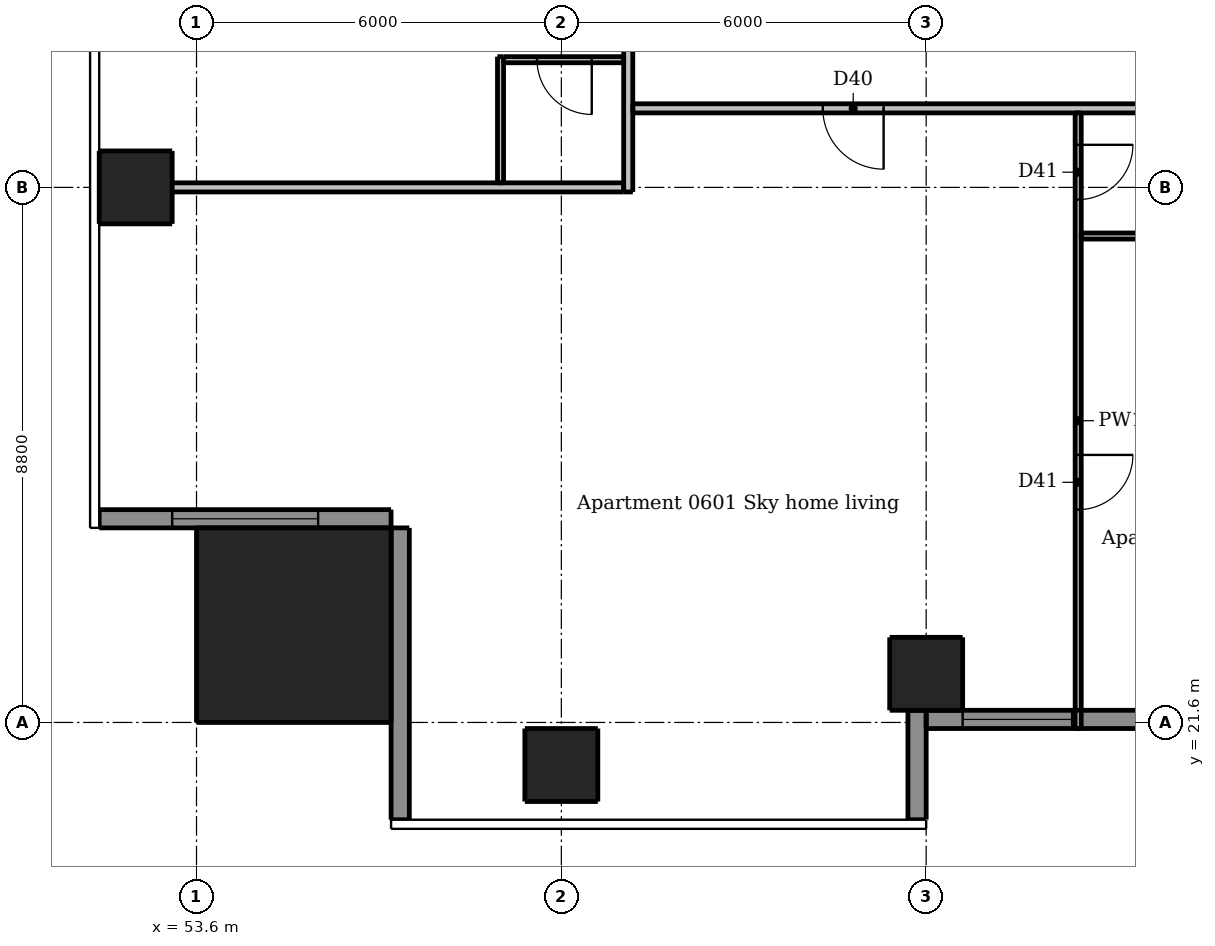
"""IFC4 building model, lengths in metres.
Left out: names, types, materials, properties, quantities, classifications, styles, units other than length and angle.
Written with IfcOpenShell. Run it as: python <this file> out.ifc"""

import sys

from ifc_helpers import new_model, si_unit, direction, frame, frame_2d, origin, origin_2d, place, context, subcontext, project, spatial, rectangle, extrude, element, fill, save


model = new_model("IFC4")
c1 = context("Model", 3, precision=1e-05, world=origin(), true_north=direction((0.0, 1.0)))
c2 = subcontext(c1, "Body", "Model", "MODEL_VIEW")
j1 = project(units=[si_unit("LENGTHUNIT", "METRE"), si_unit("PLANEANGLEUNIT", "RADIAN")], contexts=[c1])
p1 = place(None, origin())
s1 = spatial("IfcSite", under=j1, at=p1, CompositionType="ELEMENT")
p2 = place(p1, origin())
s2 = spatial("IfcBuilding", under=s1, at=p2, CompositionType="ELEMENT")
p3 = place(p2, frame((0.0, 0.0, 26.8)))
s3 = spatial("IfcBuildingStorey", under=s2, at=p3, CompositionType="ELEMENT", Elevation=26.8)
for number, where, z_axis, x_axis in (
    (1, (59.6, 20.9, 0.0), (0.0, 0.0, 1.0), (1.0, 0.0, 0.0)),
    (2, (65.6, 22.4, 0.0), (0.0, 0.0, 1.0), (1.0, 0.0, 0.0)),
    (3, (52.6, 30.4, 0.0), (0.0, 0.0, 1.0), (1.0, 0.0, 0.0)),
):
    element("IfcColumn", number, at=place(p3, frame(where, z_axis=z_axis, x_axis=x_axis)), inside=s3, PredefinedType="COLUMN", context=c2, shape_type="SweptSolid", body=[
        extrude(rectangle(XDim=1.2, YDim=1.2, at=origin_2d()), origin(), (0.0, 0.0, 1.0), 3.05),
    ])
p4 = place(p3, frame((55.2, 23.2, 0.0), z_axis=(0.0, 0.0, 1.0), x_axis=(1.0, 0.0, 0.0)))
e4 = element("IfcColumn", 4, at=p4, inside=s3, PredefinedType="COLUMN", context=c2, shape_type="SweptSolid", body=[
    extrude(rectangle(XDim=3.2, YDim=3.2, at=origin_2d()), origin(), (0.0, 0.0, 1.0), 3.3),
])
p5 = place(p2, frame((0.0, 0.0, 23.5)))
s4 = spatial("IfcBuildingStorey", under=s2, at=p5, CompositionType="ELEMENT", Elevation=23.5)
p6 = place(p5, frame((51.3, 25.55, -0.45), z_axis=(0.0, 0.0, 1.0), x_axis=(0.0, 1.0, 0.0)))
e5 = element("IfcWall", 5, at=p6, inside=s4, PredefinedType="SHEAR", context=c2, shape_type="SweptSolid", body=[
    extrude(rectangle(XDim=3.25, YDim=0.6, at=frame_2d((1.625, 0.0))), origin(), (0.0, 0.0, 1.0), 5.45),
])
p7 = place(p3, frame((65.45, 20.0, 0.0), z_axis=(0.0, 0.0, 1.0), x_axis=(0.0, 1.0, 0.0)))
e6 = element("IfcWall", 6, at=p7, inside=s3, PredefinedType="SOLIDWALL", context=c2, shape_type="SweptSolid", body=[
    extrude(rectangle(XDim=1.8, YDim=0.3, at=frame_2d((0.9, 0.0))), origin(), (0.0, 0.0, 1.0), 3.05),
])
p8 = place(p3, frame((52.0, 24.95, 0.0), z_axis=(0.0, 0.0, 1.0), x_axis=(1.0, 0.0, 0.0)))
e7 = element("IfcWall", 7, at=p8, inside=s3, PredefinedType="SOLIDWALL", context=c2, shape_type="SweptSolid", body=[
    extrude(rectangle(XDim=4.8, YDim=0.3, at=frame_2d((2.4, 0.0))), origin(), (0.0, 0.0, 1.0), 3.05),
])
p9 = place(p8, frame((1.2, 0.0, 0.15)))
e8 = element("IfcOpeningElement", 8, at=p9, cuts=e7, PredefinedType="OPENING", context=c2, shape_type="SweptSolid", body=[
    extrude(rectangle(XDim=2.4, YDim=2.1, at=frame_2d((1.2, 1.05))), frame((0.0, 0.16, 0.0), z_axis=(0.0, -1.0, 0.0), x_axis=(1.0, 0.0, 0.0)), (0.0, 0.0, 1.0), 0.32),
])
p10 = place(p3, frame((56.95, 24.8, 0.0), z_axis=(0.0, 0.0, 1.0), x_axis=(0.0, -1.0, 0.0)))
e9 = element("IfcWall", 9, at=p10, inside=s3, PredefinedType="SOLIDWALL", context=c2, shape_type="SweptSolid", body=[
    extrude(rectangle(XDim=4.8, YDim=0.3, at=frame_2d((2.4, 0.0))), origin(), (0.0, 0.0, 1.0), 3.05),
])
p11 = place(p3, frame((65.6, 21.65, 0.0), z_axis=(0.0, 0.0, 1.0), x_axis=(1.0, 0.0, 0.0)))
e10 = element("IfcWall", 10, at=p11, inside=s3, PredefinedType="SOLIDWALL", context=c2, shape_type="SweptSolid", body=[
    extrude(rectangle(XDim=6.0, YDim=0.3, at=frame_2d((3.0, 0.0))), origin(), (0.0, 0.0, 1.0), 3.05),
])
p12 = place(p11, frame((0.6, 0.0, 0.15)))
e11 = element("IfcOpeningElement", 11, at=p12, cuts=e10, PredefinedType="OPENING", context=c2, shape_type="SweptSolid", body=[
    extrude(rectangle(XDim=1.8, YDim=2.1, at=frame_2d((0.9, 1.05))), frame((0.0, 0.16, 0.0), z_axis=(0.0, -1.0, 0.0), x_axis=(1.0, 0.0, 0.0)), (0.0, 0.0, 1.0), 0.32),
])
p13 = place(p11, frame((3.6, 0.0, 0.15)))
e12 = element("IfcOpeningElement", 12, at=p13, cuts=e10, PredefinedType="OPENING", context=c2, shape_type="SweptSolid", body=[
    extrude(rectangle(XDim=1.8, YDim=2.1, at=frame_2d((0.9, 1.05))), frame((0.0, 0.16, 0.0), z_axis=(0.0, -1.0, 0.0), x_axis=(1.0, 0.0, 0.0)), (0.0, 0.0, 1.0), 0.32),
])
p14 = place(p3, frame((58.6, 30.475, 0.0), z_axis=(0.0, 0.0, 1.0), x_axis=(0.0, 1.0, 0.0)))
e13 = element("IfcWall", 13, at=p14, inside=s3, PredefinedType="PARTITIONING", context=c2, shape_type="SweptSolid", body=[
    extrude(rectangle(XDim=2.075, YDim=0.1, at=frame_2d((1.038, 0.0))), origin(), (0.0, 0.0, 1.0), 3.05),
])
p15 = place(p3, frame((68.1, 31.625, 0.0), z_axis=(0.0, 0.0, 1.0), x_axis=(0.0, -1.0, 0.0)))
e14 = element("IfcWall", 14, at=p15, inside=s3, PredefinedType="PARTITIONING", context=c2, shape_type="SweptSolid", body=[
    extrude(rectangle(XDim=10.125, YDim=0.1, at=frame_2d((5.062, 0.0))), origin(), (0.0, 0.0, 1.0), 3.05),
])
p16 = place(p15, frame((0.525, 0.0, 0.0)))
e15 = element("IfcOpeningElement", 15, at=p16, cuts=e14, PredefinedType="OPENING", context=c2, shape_type="SweptSolid", body=[
    extrude(rectangle(XDim=0.9, YDim=2.1, at=frame_2d((0.45, 1.05))), frame((0.0, 0.06, 0.0), z_axis=(0.0, -1.0, 0.0), x_axis=(1.0, 0.0, 0.0)), (0.0, 0.0, 1.0), 0.12),
])
p17 = place(p15, frame((5.625, 0.0, 0.0)))
e16 = element("IfcOpeningElement", 16, at=p17, cuts=e14, PredefinedType="OPENING", context=c2, shape_type="SweptSolid", body=[
    extrude(rectangle(XDim=0.9, YDim=2.1, at=frame_2d((0.45, 1.05))), frame((0.0, 0.06, 0.0), z_axis=(0.0, -1.0, 0.0), x_axis=(1.0, 0.0, 0.0)), (0.0, 0.0, 1.0), 0.12),
])
p18 = place(p3, frame((60.625, 32.5, 0.0), z_axis=(0.0, 0.0, 1.0), x_axis=(-1.0, 0.0, 0.0)))
e17 = element("IfcWall", 17, at=p18, inside=s3, PredefinedType="PARTITIONING", context=c2, shape_type="SweptSolid", body=[
    extrude(rectangle(XDim=1.975, YDim=0.1, at=frame_2d((0.988, 0.0))), origin(), (0.0, 0.0, 1.0), 3.05),
])
p19 = place(p18, frame((0.525, 0.0, 0.0)))
e18 = element("IfcOpeningElement", 18, at=p19, cuts=e17, PredefinedType="OPENING", context=c2, shape_type="SweptSolid", body=[
    extrude(rectangle(XDim=0.9, YDim=2.1, at=frame_2d((0.45, 1.05))), frame((0.0, 0.06, 0.0), z_axis=(0.0, -1.0, 0.0), x_axis=(1.0, 0.0, 0.0)), (0.0, 0.0, 1.0), 0.12),
])
p20 = place(p3, frame((68.15, 29.6, 0.0), z_axis=(0.0, 0.0, 1.0), x_axis=(1.0, 0.0, 0.0)))
e19 = element("IfcWall", 19, at=p20, inside=s3, PredefinedType="PARTITIONING", context=c2, shape_type="SweptSolid", body=[
    extrude(rectangle(XDim=8.8, YDim=0.1, at=frame_2d((4.4, 0.0))), origin(), (0.0, 0.0, 1.0), 3.05),
])
p21 = place(p20, frame((4.0, 0.0, 0.0)))
e20 = element("IfcOpeningElement", 20, at=p21, cuts=e19, PredefinedType="OPENING", context=c2, shape_type="SweptSolid", body=[
    extrude(rectangle(XDim=0.8, YDim=2.1, at=frame_2d((0.4, 1.05))), frame((0.0, 0.06, 0.0), z_axis=(0.0, -1.0, 0.0), x_axis=(1.0, 0.0, 0.0)), (0.0, 0.0, 1.0), 0.12),
])
p22 = place(p20, frame((7.2, 0.0, 0.0)))
e21 = element("IfcOpeningElement", 21, at=p22, cuts=e19, PredefinedType="OPENING", context=c2, shape_type="SweptSolid", body=[
    extrude(rectangle(XDim=0.9, YDim=2.1, at=frame_2d((0.45, 1.05))), frame((0.0, 0.06, 0.0), z_axis=(0.0, -1.0, 0.0), x_axis=(1.0, 0.0, 0.0)), (0.0, 0.0, 1.0), 0.12),
])
p23 = place(p3, frame((60.7, 30.325, 0.0), z_axis=(0.0, 0.0, 1.0), x_axis=(0.0, 1.0, 0.0)))
e22 = element("IfcWall", 22, at=p23, inside=s3, PredefinedType="PARTITIONING", context=c2, shape_type="SweptSolid", body=[
    extrude(rectangle(XDim=28.9, YDim=0.15, at=frame_2d((14.45, 0.0))), origin(), (0.0, 0.0, 1.0), 3.05),
])
p24 = place(p23, frame((2.575, 0.0, 0.0)))
e23 = element("IfcOpeningElement", 23, at=p24, cuts=e22, PredefinedType="OPENING", context=c2, shape_type="SweptSolid", body=[
    extrude(rectangle(XDim=1.0, YDim=2.1, at=frame_2d((0.5, 1.05))), frame((0.0, 0.085, 0.0), z_axis=(0.0, -1.0, 0.0), x_axis=(1.0, 0.0, 0.0)), (0.0, 0.0, 1.0), 0.17),
])
p25 = place(p23, frame((8.575, 0.0, 0.0)))
e24 = element("IfcOpeningElement", 24, at=p25, cuts=e22, PredefinedType="OPENING", context=c2, shape_type="SweptSolid", body=[
    extrude(rectangle(XDim=1.0, YDim=2.1, at=frame_2d((0.5, 1.05))), frame((0.0, 0.085, 0.0), z_axis=(0.0, -1.0, 0.0), x_axis=(1.0, 0.0, 0.0)), (0.0, 0.0, 1.0), 0.17),
])
p26 = place(p23, frame((14.575, 0.0, 0.0)))
e25 = element("IfcOpeningElement", 25, at=p26, cuts=e22, PredefinedType="OPENING", context=c2, shape_type="SweptSolid", body=[
    extrude(rectangle(XDim=1.0, YDim=2.1, at=frame_2d((0.5, 1.05))), frame((0.0, 0.085, 0.0), z_axis=(0.0, -1.0, 0.0), x_axis=(1.0, 0.0, 0.0)), (0.0, 0.0, 1.0), 0.17),
])
p27 = place(p23, frame((26.025, 0.0, 0.0)))
e26 = element("IfcOpeningElement", 26, at=p27, cuts=e22, PredefinedType="OPENING", context=c2, shape_type="SweptSolid", body=[
    extrude(rectangle(XDim=1.0, YDim=2.1, at=frame_2d((0.5, 1.05))), frame((0.0, 0.085, 0.0), z_axis=(0.0, -1.0, 0.0), x_axis=(1.0, 0.0, 0.0)), (0.0, 0.0, 1.0), 0.17),
])
p28 = place(p3, frame((89.525, 31.7, 0.0), z_axis=(0.0, 0.0, 1.0), x_axis=(-1.0, 0.0, 0.0)))
e27 = element("IfcWall", 27, at=p28, inside=s3, PredefinedType="PARTITIONING", context=c2, shape_type="SweptSolid", body=[
    extrude(rectangle(XDim=28.75, YDim=0.15, at=frame_2d((14.375, 0.0))), origin(), (0.0, 0.0, 1.0), 3.05),
])
p29 = place(p28, frame((24.625, 0.0, 0.0)))
e28 = element("IfcOpeningElement", 28, at=p29, cuts=e27, PredefinedType="OPENING", context=c2, shape_type="SweptSolid", body=[
    extrude(rectangle(XDim=1.0, YDim=2.1, at=frame_2d((0.5, 1.05))), frame((0.0, 0.085, 0.0), z_axis=(0.0, -1.0, 0.0), x_axis=(1.0, 0.0, 0.0)), (0.0, 0.0, 1.0), 0.17),
])
p30 = place(p28, frame((10.225, 0.0, 0.0)))
e29 = element("IfcOpeningElement", 29, at=p30, cuts=e27, PredefinedType="OPENING", context=c2, shape_type="SweptSolid", body=[
    extrude(rectangle(XDim=1.0, YDim=2.1, at=frame_2d((0.5, 1.05))), frame((0.0, 0.085, 0.0), z_axis=(0.0, -1.0, 0.0), x_axis=(1.0, 0.0, 0.0)), (0.0, 0.0, 1.0), 0.17),
])
p31 = place(p28, frame((2.425, 0.0, 0.0)))
e30 = element("IfcOpeningElement", 30, at=p31, cuts=e27, PredefinedType="OPENING", context=c2, shape_type="SweptSolid", body=[
    extrude(rectangle(XDim=1.0, YDim=2.1, at=frame_2d((0.5, 1.05))), frame((0.0, 0.085, 0.0), z_axis=(0.0, -1.0, 0.0), x_axis=(1.0, 0.0, 0.0)), (0.0, 0.0, 1.0), 0.17),
])
p32 = place(p3, frame((52.0, 30.4, 0.0), z_axis=(0.0, 0.0, 1.0), x_axis=(1.0, 0.0, 0.0)))
e31 = element("IfcWall", 31, at=p32, inside=s3, PredefinedType="PARTITIONING", context=c2, shape_type="SweptSolid", body=[
    extrude(rectangle(XDim=8.625, YDim=0.15, at=frame_2d((4.312, 0.0))), origin(), (0.0, 0.0, 1.0), 2.647),
])
p33 = place(p9, origin())
e32 = element("IfcWindow", 32, at=p33, inside=s3, PartitioningType="DOUBLE_PANEL_VERTICAL", PredefinedType="WINDOW", context=c2, shape_type="SweptSolid", body=[
    extrude(rectangle(XDim=2.4, YDim=2.1, at=frame_2d((1.2, 1.05))), frame((0.0, 0.03, 0.0), z_axis=(0.0, -1.0, 0.0), x_axis=(1.0, 0.0, 0.0)), (0.0, 0.0, 1.0), 0.06),
])
fill(e8, e32)
p34 = place(p12, origin())
e33 = element("IfcWindow", 33, at=p34, inside=s3, PartitioningType="DOUBLE_PANEL_VERTICAL", PredefinedType="WINDOW", context=c2, shape_type="SweptSolid", body=[
    extrude(rectangle(XDim=1.8, YDim=2.1, at=frame_2d((0.9, 1.05))), frame((0.0, 0.03, 0.0), z_axis=(0.0, -1.0, 0.0), x_axis=(1.0, 0.0, 0.0)), (0.0, 0.0, 1.0), 0.06),
])
fill(e11, e33)
p35 = place(p29, origin())
e34 = element("IfcDoor", 34, at=p35, inside=s3, OperationType="SINGLE_SWING_LEFT", PredefinedType="DOOR", context=c2, shape_type="SweptSolid", body=[
    extrude(rectangle(XDim=1.0, YDim=2.1, at=frame_2d((0.5, 1.05))), frame((0.0, 0.025, 0.0), z_axis=(0.0, -1.0, 0.0), x_axis=(1.0, 0.0, 0.0)), (0.0, 0.0, 1.0), 0.05),
])
fill(e28, e34)
p36 = place(p16, origin())
e35 = element("IfcDoor", 35, at=p36, inside=s3, OperationType="SINGLE_SWING_LEFT", PredefinedType="DOOR", context=c2, shape_type="SweptSolid", body=[
    extrude(rectangle(XDim=0.9, YDim=2.1, at=frame_2d((0.45, 1.05))), frame((0.0, 0.025, 0.0), z_axis=(0.0, -1.0, 0.0), x_axis=(1.0, 0.0, 0.0)), (0.0, 0.0, 1.0), 0.05),
])
fill(e15, e35)
p37 = place(p17, origin())
e36 = element("IfcDoor", 36, at=p37, inside=s3, OperationType="SINGLE_SWING_LEFT", PredefinedType="DOOR", context=c2, shape_type="SweptSolid", body=[
    extrude(rectangle(XDim=0.9, YDim=2.1, at=frame_2d((0.45, 1.05))), frame((0.0, 0.025, 0.0), z_axis=(0.0, -1.0, 0.0), x_axis=(1.0, 0.0, 0.0)), (0.0, 0.0, 1.0), 0.05),
])
fill(e16, e36)
p38 = place(p19, origin())
e37 = element("IfcDoor", 37, at=p38, inside=s3, OperationType="SINGLE_SWING_LEFT", PredefinedType="DOOR", context=c2, shape_type="SweptSolid", body=[
    extrude(rectangle(XDim=0.9, YDim=2.1, at=frame_2d((0.45, 1.05))), frame((0.0, 0.025, 0.0), z_axis=(0.0, -1.0, 0.0), x_axis=(1.0, 0.0, 0.0)), (0.0, 0.0, 1.0), 0.05),
])
fill(e18, e37)
save(model, sys.argv[1])
